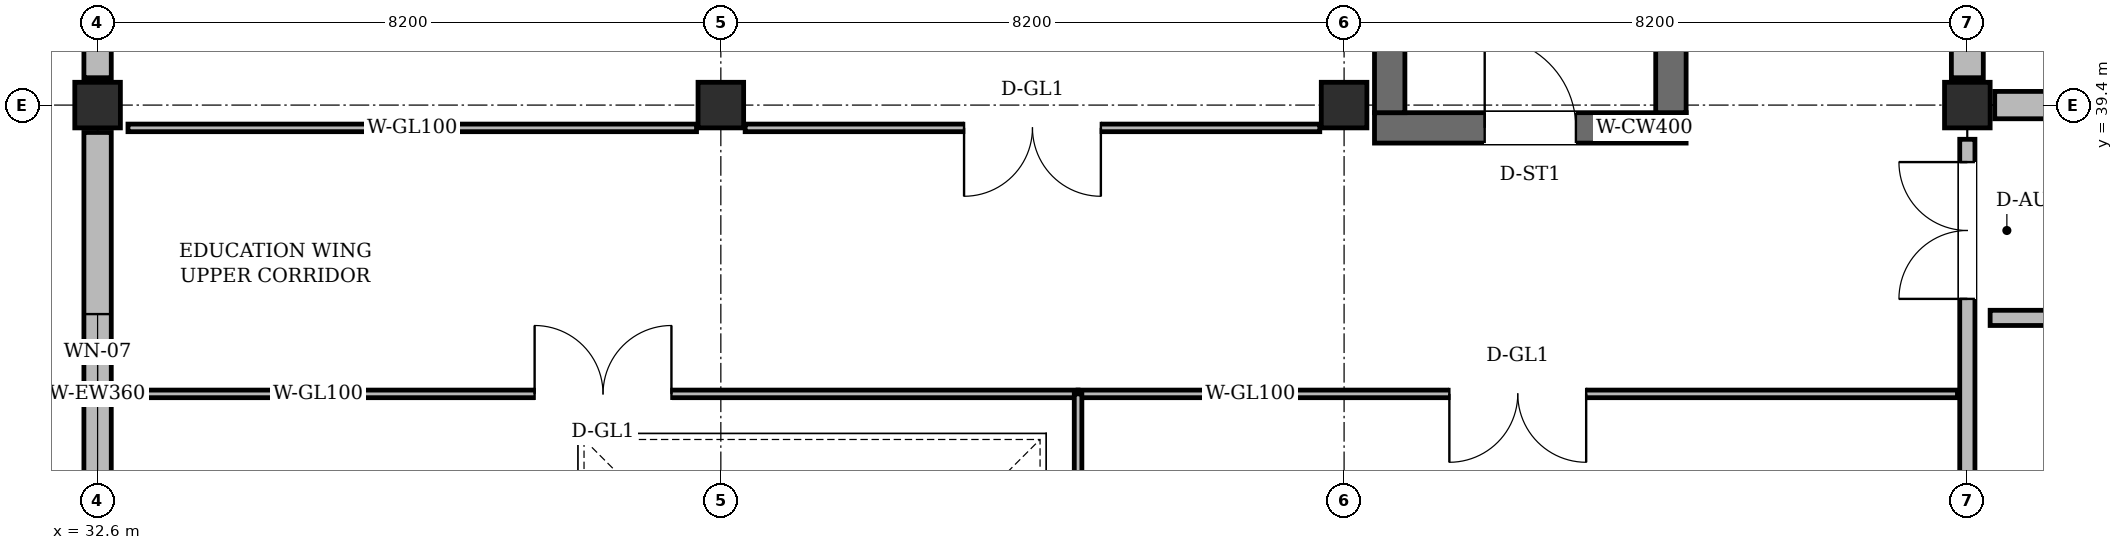
"""IFC4 building model, lengths in metres.
Left out: names, types, materials, properties, quantities, classifications, styles, units other than length and angle.
Written with IfcOpenShell. Run it as: python <this file> out.ifc"""

import sys

from ifc_helpers import new_model, si_unit, direction, frame, frame_2d, origin, origin_2d, place, context, subcontext, project, spatial, rectangle, extrude, element, fill, save


model = new_model("IFC4")
c1 = context("Model", 3, precision=1e-05, world=origin(), true_north=direction((0.0, 1.0)))
c2 = subcontext(c1, "Body", "Model", "MODEL_VIEW")
j1 = project(units=[si_unit("LENGTHUNIT", "METRE"), si_unit("PLANEANGLEUNIT", "RADIAN")], contexts=[c1])
p1 = place(None, origin())
s1 = spatial("IfcSite", under=j1, at=p1, CompositionType="ELEMENT")
p2 = place(p1, origin())
s2 = spatial("IfcBuilding", under=s1, at=p2, CompositionType="ELEMENT")
p3 = place(p2, frame((0.0, 0.0, 5.4)))
s3 = spatial("IfcBuildingStorey", under=s2, at=p3, CompositionType="ELEMENT", Elevation=5.4)
for number, where, z_axis, x_axis in (
    (1, (32.6, 39.4, 0.0), (0.0, 0.0, 1.0), (1.0, 0.0, 0.0)),
    (2, (40.8, 39.4, 0.0), (0.0, 0.0, 1.0), (1.0, 0.0, 0.0)),
    (3, (49.0, 39.4, 0.0), (0.0, 0.0, 1.0), (1.0, 0.0, 0.0)),
    (4, (57.2, 39.4, 0.0), (0.0, 0.0, 1.0), (1.0, 0.0, 0.0)),
):
    element("IfcColumn", number, at=place(p3, frame(where, z_axis=z_axis, x_axis=x_axis)), inside=s3, PredefinedType="COLUMN", context=c2, shape_type="SweptSolid", body=[
        extrude(rectangle(XDim=0.6, YDim=0.6, at=origin_2d()), origin(), (0.0, 0.0, 1.0), 4.545),
    ])
p4 = place(p3, frame((65.04, 39.4, 0.0), z_axis=(0.0, 0.0, 1.0), x_axis=(-1.0, 0.0, 0.0)))
e5 = element("IfcWall", 5, at=p4, inside=s3, PredefinedType="SOLIDWALL", context=c2, shape_type="SweptSolid", body=[
    extrude(rectangle(XDim=7.48, YDim=0.36, at=frame_2d((3.74, 0.0))), origin(), (0.0, 0.0, 1.0), 3.885),
])
p5 = place(p3, frame((57.2, 39.76, 0.0), z_axis=(0.0, 0.0, 1.0), x_axis=(0.0, 1.0, 0.0)))
e6 = element("IfcWall", 6, at=p5, inside=s3, PredefinedType="SOLIDWALL", context=c2, shape_type="SweptSolid", body=[
    extrude(rectangle(XDim=6.88, YDim=0.42, at=frame_2d((3.44, 0.0))), origin(), (0.0, 0.0, 1.0), 3.885),
])
p6 = place(p5, frame((2.39, 0.0, 0.95)))
e7 = element("IfcOpeningElement", 7, at=p6, cuts=e6, PredefinedType="OPENING", context=c2, shape_type="SweptSolid", body=[
    extrude(rectangle(XDim=2.1, YDim=1.95, at=frame_2d((1.05, 0.975))), frame((0.0, 0.222, 0.0), z_axis=(0.0, -1.0, 0.0), x_axis=(1.0, 0.0, 0.0)), (0.0, 0.0, 1.0), 0.444),
])
p7 = place(p3, frame((32.6, 46.54, 0.0), z_axis=(0.0, 0.0, 1.0), x_axis=(0.0, -1.0, 0.0)))
e8 = element("IfcWall", 8, at=p7, inside=s3, PredefinedType="SOLIDWALL", context=c2, shape_type="SweptSolid", body=[
    extrude(rectangle(XDim=6.78, YDim=0.36, at=frame_2d((3.39, 0.0))), origin(), (0.0, 0.0, 1.0), 3.885),
])
p8 = place(p7, frame((2.34, 0.0, 0.95)))
e9 = element("IfcOpeningElement", 9, at=p8, cuts=e8, PredefinedType="OPENING", context=c2, shape_type="SweptSolid", body=[
    extrude(rectangle(XDim=2.1, YDim=1.95, at=frame_2d((1.05, 0.975))), frame((0.0, 0.192, 0.0), z_axis=(0.0, -1.0, 0.0), x_axis=(1.0, 0.0, 0.0)), (0.0, 0.0, 1.0), 0.384),
])
p9 = place(p3, frame((32.6, 39.04, 0.0), z_axis=(0.0, 0.0, 1.0), x_axis=(0.0, -1.0, 0.0)))
e10 = element("IfcWall", 10, at=p9, inside=s3, PredefinedType="SOLIDWALL", context=c2, shape_type="SweptSolid", body=[
    extrude(rectangle(XDim=6.88, YDim=0.36, at=frame_2d((3.44, 0.0))), origin(), (0.0, 0.0, 1.0), 3.885),
])
p10 = place(p9, frame((2.39, 0.0, 0.95)))
e11 = element("IfcOpeningElement", 11, at=p10, cuts=e10, PredefinedType="OPENING", context=c2, shape_type="SweptSolid", body=[
    extrude(rectangle(XDim=2.1, YDim=1.95, at=frame_2d((1.05, 0.975))), frame((0.0, 0.192, 0.0), z_axis=(0.0, -1.0, 0.0), x_axis=(1.0, 0.0, 0.0)), (0.0, 0.0, 1.0), 0.384),
])
p11 = place(p3, frame((49.4, 39.1, 0.0), z_axis=(0.0, 0.0, 1.0), x_axis=(1.0, 0.0, 0.0)))
e12 = element("IfcWall", 12, at=p11, inside=s3, PredefinedType="SHEAR", context=c2, shape_type="SweptSolid", body=[
    extrude(rectangle(XDim=4.1, YDim=0.4, at=frame_2d((2.05, 0.0))), origin(), (0.0, 0.0, 1.0), 4.52),
])
p12 = place(p11, frame((1.45, 0.0, 0.0)))
e13 = element("IfcOpeningElement", 13, at=p12, cuts=e12, PredefinedType="OPENING", context=c2, shape_type="SweptSolid", body=[
    extrude(rectangle(XDim=1.2, YDim=2.2, at=frame_2d((0.6, 1.1))), frame((0.0, 0.212, 0.0), z_axis=(0.0, -1.0, 0.0), x_axis=(1.0, 0.0, 0.0)), (0.0, 0.0, 1.0), 0.424),
])
for number, where, z_axis, x_axis in (
    (14, (49.6, 39.3, 0.0), (0.0, 0.0, 1.0), (0.0, 1.0, 0.0)),
    (15, (53.3, 39.3, 0.0), (0.0, 0.0, 1.0), (0.0, 1.0, 0.0)),
):
    element("IfcWall", number, at=place(p3, frame(where, z_axis=z_axis, x_axis=x_axis)), inside=s3, PredefinedType="SHEAR", context=c2, shape_type="SweptSolid", body=[
        extrude(rectangle(XDim=7.6, YDim=0.4, at=frame_2d((3.8, 0.0))), origin(), (0.0, 0.0, 1.0), 4.52),
    ])
p13 = place(p3, frame((57.2, 32.25, 0.0), z_axis=(0.0, 0.0, 1.0), x_axis=(0.0, 1.0, 0.0)))
e16 = element("IfcWall", 16, at=p13, inside=s3, PredefinedType="PARTITIONING", context=c2, shape_type="SweptSolid", body=[
    extrude(rectangle(XDim=6.7, YDim=0.2, at=frame_2d((3.35, 0.0))), origin(), (0.0, 0.0, 1.0), 3.93),
])
p14 = place(p13, frame((4.6, 0.0, 0.0)))
e17 = element("IfcOpeningElement", 17, at=p14, cuts=e16, PredefinedType="OPENING", context=c2, shape_type="SweptSolid", body=[
    extrude(rectangle(XDim=1.8, YDim=2.4, at=frame_2d((0.9, 1.2))), frame((0.0, 0.112, 0.0), z_axis=(0.0, -1.0, 0.0), x_axis=(1.0, 0.0, 0.0)), (0.0, 0.0, 1.0), 0.224),
])
p15 = place(p3, frame((61.4, 36.6, 0.0), z_axis=(0.0, 0.0, 1.0), x_axis=(-1.0, 0.0, 0.0)))
e18 = element("IfcWall", 18, at=p15, inside=s3, PredefinedType="PARTITIONING", context=c2, shape_type="SweptSolid", body=[
    extrude(rectangle(XDim=3.9, YDim=0.2, at=frame_2d((1.95, 0.0))), origin(), (0.0, 0.0, 1.0), 4.405),
])
p16 = place(p15, frame((1.05, 0.0, 0.0)))
e19 = element("IfcOpeningElement", 19, at=p16, cuts=e18, PredefinedType="OPENING", context=c2, shape_type="SweptSolid", body=[
    extrude(rectangle(XDim=1.8, YDim=2.4, at=frame_2d((0.9, 1.2))), frame((0.0, 0.112, 0.0), z_axis=(0.0, -1.0, 0.0), x_axis=(1.0, 0.0, 0.0)), (0.0, 0.0, 1.0), 0.224),
])
p17 = place(p3, frame((45.5, 35.6, 0.0), z_axis=(0.0, 0.0, 1.0), x_axis=(-1.0, 0.0, 0.0)))
e20 = element("IfcWall", 20, at=p17, inside=s3, PredefinedType="PARTITIONING", context=c2, shape_type="SweptSolid", body=[
    extrude(rectangle(XDim=12.5, YDim=0.1, at=frame_2d((6.25, 0.0))), origin(), (0.0, 0.0, 1.0), 4.405),
])
p18 = place(p17, frame((5.35, 0.0, 0.0)))
e21 = element("IfcOpeningElement", 21, at=p18, cuts=e20, PredefinedType="OPENING", context=c2, shape_type="SweptSolid", body=[
    extrude(rectangle(XDim=1.8, YDim=2.4, at=frame_2d((0.9, 1.2))), frame((0.0, 0.062, 0.0), z_axis=(0.0, -1.0, 0.0), x_axis=(1.0, 0.0, 0.0)), (0.0, 0.0, 1.0), 0.124),
])
p19 = place(p3, frame((57.07, 35.6, 0.0), z_axis=(0.0, 0.0, 1.0), x_axis=(-1.0, 0.0, 0.0)))
e22 = element("IfcWall", 22, at=p19, inside=s3, PredefinedType="PARTITIONING", context=c2, shape_type="SweptSolid", body=[
    extrude(rectangle(XDim=11.57, YDim=0.1, at=frame_2d((5.785, 0.0))), origin(), (0.0, 0.0, 1.0), 4.405),
])
p20 = place(p19, frame((4.885, 0.0, 0.0)))
e23 = element("IfcOpeningElement", 23, at=p20, cuts=e22, PredefinedType="OPENING", context=c2, shape_type="SweptSolid", body=[
    extrude(rectangle(XDim=1.8, YDim=2.4, at=frame_2d((0.9, 1.2))), frame((0.0, 0.062, 0.0), z_axis=(0.0, -1.0, 0.0), x_axis=(1.0, 0.0, 0.0)), (0.0, 0.0, 1.0), 0.124),
])
p21 = place(p3, frame((33.0, 39.1, 0.0), z_axis=(0.0, 0.0, 1.0), x_axis=(1.0, 0.0, 0.0)))
e24 = element("IfcWall", 24, at=p21, inside=s3, PredefinedType="PARTITIONING", context=c2, shape_type="SweptSolid", body=[
    extrude(rectangle(XDim=7.48, YDim=0.1, at=frame_2d((3.74, 0.0))), origin(), (0.0, 0.0, 1.0), 3.78),
])
p22 = place(p3, frame((41.12, 39.1, 0.0), z_axis=(0.0, 0.0, 1.0), x_axis=(1.0, 0.0, 0.0)))
e25 = element("IfcWall", 25, at=p22, inside=s3, PredefinedType="PARTITIONING", context=c2, shape_type="SweptSolid", body=[
    extrude(rectangle(XDim=7.56, YDim=0.1, at=frame_2d((3.78, 0.0))), origin(), (0.0, 0.0, 1.0), 3.78),
])
p23 = place(p22, frame((2.88, 0.0, 0.0)))
e26 = element("IfcOpeningElement", 26, at=p23, cuts=e25, PredefinedType="OPENING", context=c2, shape_type="SweptSolid", body=[
    extrude(rectangle(XDim=1.8, YDim=2.4, at=frame_2d((0.9, 1.2))), frame((0.0, 0.062, 0.0), z_axis=(0.0, -1.0, 0.0), x_axis=(1.0, 0.0, 0.0)), (0.0, 0.0, 1.0), 0.124),
])
p24 = place(p3, frame((45.5, 35.6, 0.0), z_axis=(0.0, 0.0, 1.0), x_axis=(0.0, -1.0, 0.0)))
e27 = element("IfcWall", 27, at=p24, inside=s3, PredefinedType="PARTITIONING", context=c2, shape_type="SweptSolid", body=[
    extrude(rectangle(XDim=18.6, YDim=0.1, at=frame_2d((9.3, 0.0))), origin(), (0.0, 0.0, 1.0), 4.405),
])
p25 = place(p10, origin())
e28 = element("IfcWindow", 28, at=p25, inside=s3, PartitioningType="DOUBLE_PANEL_VERTICAL", PredefinedType="WINDOW", context=c2, shape_type="SweptSolid", body=[
    extrude(rectangle(XDim=2.1, YDim=1.95, at=frame_2d((1.05, 0.975))), frame((0.0, 0.03, 0.0), z_axis=(0.0, -1.0, 0.0), x_axis=(1.0, 0.0, 0.0)), (0.0, 0.0, 1.0), 0.06),
])
fill(e11, e28)
p26 = place(p12, origin())
e29 = element("IfcDoor", 29, at=p26, inside=s3, OperationType="SINGLE_SWING_LEFT", PredefinedType="DOOR", context=c2, shape_type="SweptSolid", body=[
    extrude(rectangle(XDim=1.2, YDim=2.2, at=frame_2d((0.6, 1.1))), frame((0.0, 0.025, 0.0), z_axis=(0.0, -1.0, 0.0), x_axis=(1.0, 0.0, 0.0)), (0.0, 0.0, 1.0), 0.05),
])
fill(e13, e29)
p27 = place(p14, origin())
e30 = element("IfcDoor", 30, at=p27, inside=s3, OperationType="DOUBLE_DOOR_SINGLE_SWING", PredefinedType="DOOR", context=c2, shape_type="SweptSolid", body=[
    extrude(rectangle(XDim=1.8, YDim=2.4, at=frame_2d((0.9, 1.2))), frame((0.0, 0.025, 0.0), z_axis=(0.0, -1.0, 0.0), x_axis=(1.0, 0.0, 0.0)), (0.0, 0.0, 1.0), 0.05),
])
fill(e17, e30)
p28 = place(p18, frame((1.8, 0.0, 0.0), z_axis=(0.0, 0.0, 1.0), x_axis=(-1.0, 0.0, 0.0)))
e31 = element("IfcDoor", 31, at=p28, inside=s3, OperationType="DOUBLE_DOOR_SINGLE_SWING", PredefinedType="DOOR", context=c2, shape_type="SweptSolid", body=[
    extrude(rectangle(XDim=1.8, YDim=2.4, at=frame_2d((0.9, 1.2))), frame((0.0, 0.025, 0.0), z_axis=(0.0, -1.0, 0.0), x_axis=(1.0, 0.0, 0.0)), (0.0, 0.0, 1.0), 0.05),
])
fill(e21, e31)
p29 = place(p20, origin())
e32 = element("IfcDoor", 32, at=p29, inside=s3, OperationType="DOUBLE_DOOR_SINGLE_SWING", PredefinedType="DOOR", context=c2, shape_type="SweptSolid", body=[
    extrude(rectangle(XDim=1.8, YDim=2.4, at=frame_2d((0.9, 1.2))), frame((0.0, 0.025, 0.0), z_axis=(0.0, -1.0, 0.0), x_axis=(1.0, 0.0, 0.0)), (0.0, 0.0, 1.0), 0.05),
])
fill(e23, e32)
p30 = place(p23, frame((1.8, 0.0, 0.0), z_axis=(0.0, 0.0, 1.0), x_axis=(-1.0, 0.0, 0.0)))
e33 = element("IfcDoor", 33, at=p30, inside=s3, OperationType="DOUBLE_DOOR_SINGLE_SWING", PredefinedType="DOOR", context=c2, shape_type="SweptSolid", body=[
    extrude(rectangle(XDim=1.8, YDim=2.4, at=frame_2d((0.9, 1.2))), frame((0.0, 0.025, 0.0), z_axis=(0.0, -1.0, 0.0), x_axis=(1.0, 0.0, 0.0)), (0.0, 0.0, 1.0), 0.05),
])
fill(e26, e33)
save(model, sys.argv[1])
